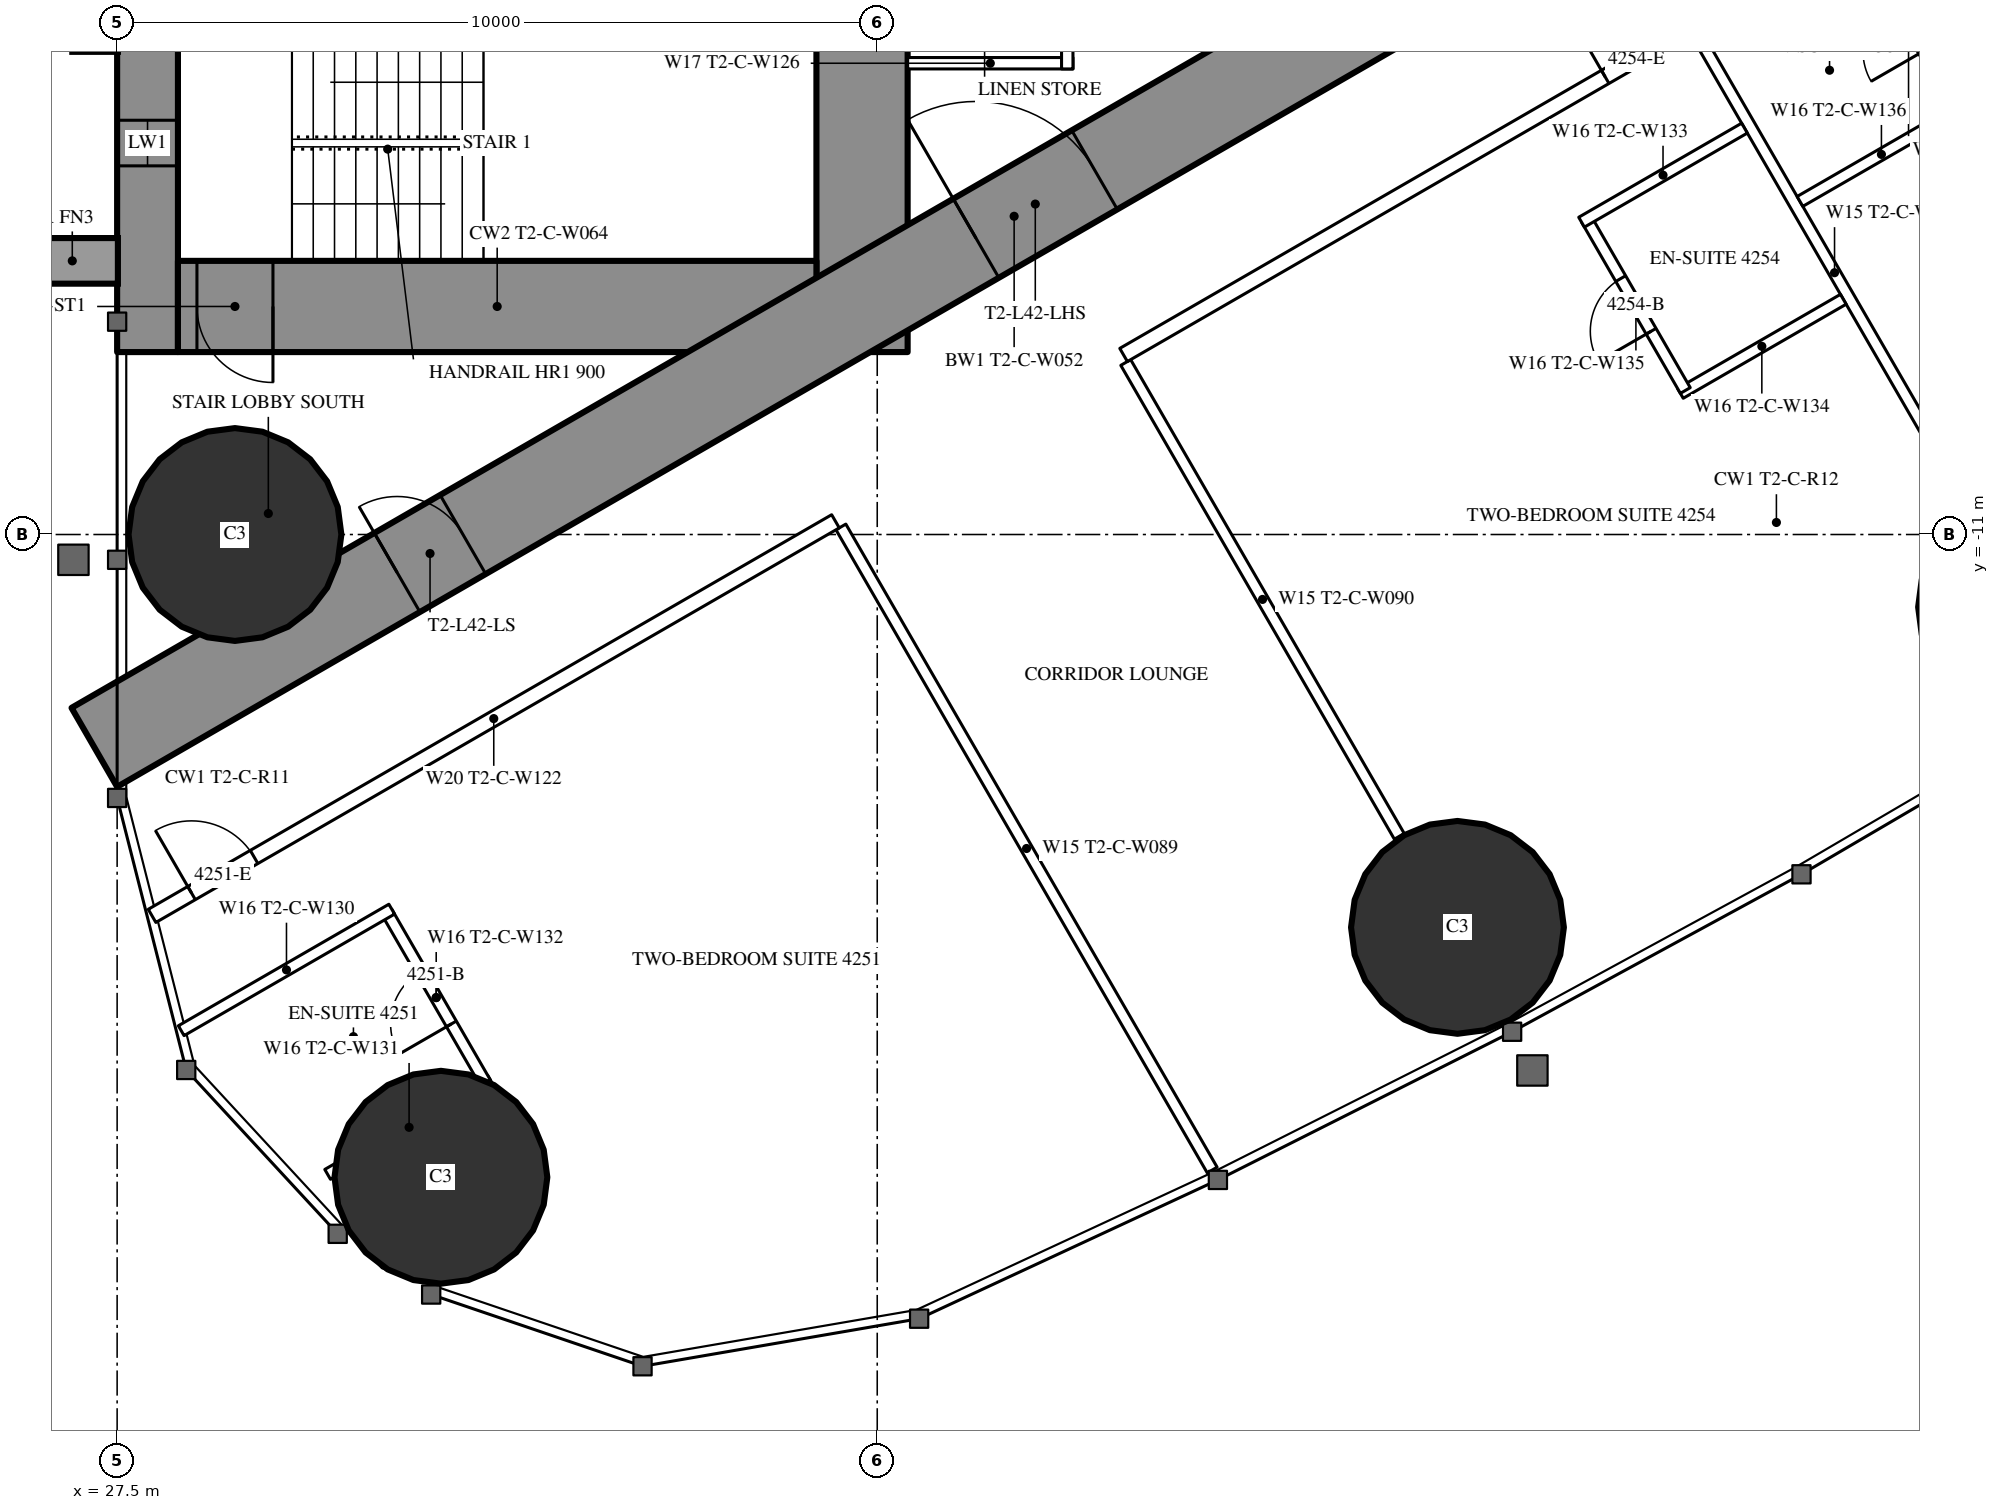
"""IFC4 building model, lengths in metres.
Left out: names, types, materials, properties, quantities, classifications, styles, units other than length and angle.
Written with IfcOpenShell. Run it as: python <this file> out.ifc"""

import sys

from ifc_helpers import new_model, si_unit, direction, frame, frame_2d, origin, origin_2d, place, context, subcontext, project, spatial, rectangle, circle, extrude, element, fill, save


model = new_model("IFC4")
c1 = context("Model", 3, precision=1e-05, world=origin(), true_north=direction((0.0, 1.0)))
c2 = subcontext(c1, "Body", "Model", "MODEL_VIEW")
j1 = project(units=[si_unit("LENGTHUNIT", "METRE"), si_unit("PLANEANGLEUNIT", "RADIAN")], contexts=[c1])
p1 = place(None, origin())
s1 = spatial("IfcSite", under=j1, at=p1, CompositionType="ELEMENT")
p2 = place(p1, origin())
s2 = spatial("IfcBuilding", under=s1, at=p2, CompositionType="ELEMENT")
p3 = place(p2, frame((0.0, 0.0, 159.8)))
s3 = spatial("IfcBuildingStorey", under=s2, at=p3, CompositionType="ELEMENT", Elevation=159.8)
for number, where, z_axis, x_axis in (
    (1, (31.76, -19.456, 0.0), (0.0, 0.0, 1.0), (1.0, 0.0, 0.0)),
    (2, (29.05, -11.0, 0.0), (0.0, 0.0, 1.0), (1.0, 0.0, 0.0)),
    (3, (45.134, -16.168, 0.0), (0.0, 0.0, 1.0), (1.0, 0.0, 0.0)),
    (4, (52.594, -11.955, 0.0), (0.0, 0.0, 1.0), (1.0, 0.0, 0.0)),
):
    element("IfcColumn", number, at=place(p3, frame(where, z_axis=z_axis, x_axis=x_axis)), inside=s3, PredefinedType="COLUMN", context=c2, shape_type="SweptSolid", body=[
        extrude(circle(Radius=1.4, at=origin_2d()), origin(), (0.0, 0.0, 1.0), 3.5),
    ])
p4 = place(p3, frame((27.9, -8.6, 0.0), z_axis=(0.0, 0.0, 1.0), x_axis=(0.0, 1.0, 0.0)))
e5 = element("IfcWall", 5, at=p4, inside=s3, PredefinedType="SHEAR", context=c2, shape_type="SweptSolid", body=[
    extrude(rectangle(XDim=17.2, YDim=0.8, at=frame_2d((8.6, 0.0))), origin(), (0.0, 0.0, 1.0), 3.5),
])
p5 = place(p4, frame((2.45, 0.0, 0.6)))
e6 = element("IfcOpeningElement", 6, at=p5, cuts=e5, PredefinedType="OPENING", context=c2, shape_type="SweptSolid", body=[
    extrude(rectangle(XDim=0.6, YDim=2.1, at=frame_2d((0.3, 1.05))), frame((0.0, 0.41, 0.0), z_axis=(0.0, -1.0, 0.0), x_axis=(1.0, 0.0, 0.0)), (0.0, 0.0, 1.0), 0.82),
])
p6 = place(p4, frame((14.15, 0.0, 0.6)))
e7 = element("IfcOpeningElement", 7, at=p6, cuts=e5, PredefinedType="OPENING", context=c2, shape_type="SweptSolid", body=[
    extrude(rectangle(XDim=0.6, YDim=2.1, at=frame_2d((0.3, 1.05))), frame((0.0, 0.41, 0.0), z_axis=(0.0, -1.0, 0.0), x_axis=(1.0, 0.0, 0.0)), (0.0, 0.0, 1.0), 0.82),
])
p7 = place(p3, frame((37.3, -8.6, 0.0), z_axis=(0.0, 0.0, 1.0), x_axis=(0.0, 1.0, 0.0)))
e8 = element("IfcWall", 8, at=p7, inside=s3, PredefinedType="SHEAR", context=c2, shape_type="SweptSolid", body=[
    extrude(rectangle(XDim=17.2, YDim=1.2, at=frame_2d((8.6, 0.0))), origin(), (0.0, 0.0, 1.0), 3.5),
])
p8 = place(p7, frame((7.7, 0.0, 0.0)))
e9 = element("IfcOpeningElement", 9, at=p8, cuts=e8, PredefinedType="OPENING", context=c2, shape_type="SweptSolid", body=[
    extrude(rectangle(XDim=1.8, YDim=2.2, at=frame_2d((0.9, 1.1))), frame((0.0, 0.61, 0.0), z_axis=(0.0, -1.0, 0.0), x_axis=(1.0, 0.0, 0.0)), (0.0, 0.0, 1.0), 1.22),
])
p9 = place(p3, frame((28.3, -8.0, 0.0), z_axis=(0.0, 0.0, 1.0), x_axis=(1.0, 0.0, 0.0)))
e10 = element("IfcWall", 10, at=p9, inside=s3, PredefinedType="SHEAR", context=c2, shape_type="SweptSolid", body=[
    extrude(rectangle(XDim=8.4, YDim=1.2, at=frame_2d((4.2, 0.0))), origin(), (0.0, 0.0, 1.0), 3.5),
])
p10 = place(p9, frame((0.25, 0.0, 0.0)))
e11 = element("IfcOpeningElement", 11, at=p10, cuts=e10, PredefinedType="OPENING", context=c2, shape_type="SweptSolid", body=[
    extrude(rectangle(XDim=1.0, YDim=2.2, at=frame_2d((0.5, 1.1))), frame((0.0, 0.61, 0.0), z_axis=(0.0, -1.0, 0.0), x_axis=(1.0, 0.0, 0.0)), (0.0, 0.0, 1.0), 1.22),
])
p11 = place(p3, frame((27.2, -13.8, 0.0), z_axis=(0.0, 0.0, 1.0), x_axis=(0.866027159892, 0.499996958321, 0.0)))
e12 = element("IfcWall", 12, at=p11, inside=s3, PredefinedType="SHEAR", context=c2, shape_type="SweptSolid", body=[
    extrude(rectangle(XDim=27.947, YDim=1.2, at=frame_2d((13.973, 0.0))), origin(), (0.0, 0.0, 1.0), 3.5),
])
p12 = place(p11, frame((4.6, 0.0, 0.0)))
e13 = element("IfcOpeningElement", 13, at=p12, cuts=e12, PredefinedType="OPENING", context=c2, shape_type="SweptSolid", body=[
    extrude(rectangle(XDim=1.0, YDim=2.2, at=frame_2d((0.5, 1.1))), frame((0.0, 0.61, 0.0), z_axis=(0.0, -1.0, 0.0), x_axis=(1.0, 0.0, 0.0)), (0.0, 0.0, 1.0), 1.22),
])
p13 = place(p11, frame((13.395, 0.0, 0.0)))
e14 = element("IfcOpeningElement", 14, at=p13, cuts=e12, PredefinedType="OPENING", context=c2, shape_type="SweptSolid", body=[
    extrude(rectangle(XDim=1.8, YDim=2.2, at=frame_2d((0.9, 1.1))), frame((0.0, 0.61, 0.0), z_axis=(0.0, -1.0, 0.0), x_axis=(1.0, 0.0, 0.0)), (0.0, 0.0, 1.0), 1.22),
])
p14 = place(p3, frame((37.022, -10.9, 0.0), z_axis=(0.0, 0.0, 1.0), x_axis=(0.499998620953, -0.866026199976, 0.0)))
e15 = element("IfcWall", 15, at=p14, inside=s3, PredefinedType="PARTITIONING", context=c2, shape_type="SweptSolid", body=[
    extrude(rectangle(XDim=9.77, YDim=0.15, at=frame_2d((4.885, 0.0))), origin(), (0.0, 0.0, 1.0), 3.25),
])
p15 = place(p3, frame((40.769, -8.737, 0.0), z_axis=(0.0, 0.0, 1.0), x_axis=(0.500013115284, -0.866017831539, 0.0)))
e16 = element("IfcWall", 16, at=p15, inside=s3, PredefinedType="PARTITIONING", context=c2, shape_type="SweptSolid", body=[
    extrude(rectangle(XDim=7.198, YDim=0.15, at=frame_2d((3.599, 0.0))), origin(), (0.0, 0.0, 1.0), 2.3),
])
p16 = place(p3, frame((48.275, -4.404, 0.0), z_axis=(0.0, 0.0, 1.0), x_axis=(0.500006004368, -0.866021937133, 0.0)))
e17 = element("IfcWall", 17, at=p16, inside=s3, PredefinedType="PARTITIONING", context=c2, shape_type="SweptSolid", body=[
    extrude(rectangle(XDim=7.279, YDim=0.15, at=frame_2d((3.64, 0.0))), origin(), (0.0, 0.0, 1.0), 2.3),
])
p17 = place(p3, frame((27.959, -16.017, 0.0), z_axis=(0.0, 0.0, 1.0), x_axis=(0.866026201739, 0.499998617899, 0.0)))
e18 = element("IfcWall", 18, at=p17, inside=s3, PredefinedType="PARTITIONING", context=c2, shape_type="SweptSolid", body=[
    extrude(rectangle(XDim=10.382, YDim=0.2, at=frame_2d((5.191, 0.0))), origin(), (0.0, 0.0, 1.0), 3.25),
])
p18 = place(p17, frame((0.6, 0.0, 0.0)))
e19 = element("IfcOpeningElement", 19, at=p18, cuts=e18, PredefinedType="OPENING", context=c2, shape_type="SweptSolid", body=[
    extrude(rectangle(XDim=0.95, YDim=2.2, at=frame_2d((0.475, 1.1))), frame((0.0, 0.11, 0.0), z_axis=(0.0, -1.0, 0.0), x_axis=(1.0, 0.0, 0.0)), (0.0, 0.0, 1.0), 0.22),
])
p19 = place(p3, frame((40.741, -8.638, 0.0), z_axis=(0.0, 0.0, 1.0), x_axis=(0.866022967338, 0.500004220025, 0.0)))
e20 = element("IfcWall", 20, at=p19, inside=s3, PredefinedType="PARTITIONING", context=c2, shape_type="SweptSolid", body=[
    extrude(rectangle(XDim=17.276, YDim=0.2, at=frame_2d((8.638, 0.0))), origin(), (0.0, 0.0, 1.0), 3.25),
])
p20 = place(p19, frame((7.316, 0.0, 0.0)))
e21 = element("IfcOpeningElement", 21, at=p20, cuts=e20, PredefinedType="OPENING", context=c2, shape_type="SweptSolid", body=[
    extrude(rectangle(XDim=0.95, YDim=2.2, at=frame_2d((0.475, 1.1))), frame((0.0, 0.11, 0.0), z_axis=(0.0, -1.0, 0.0), x_axis=(1.0, 0.0, 0.0)), (0.0, 0.0, 1.0), 0.22),
])
p21 = place(p19, frame((11.366, 0.0, 0.0)))
e22 = element("IfcOpeningElement", 22, at=p21, cuts=e20, PredefinedType="OPENING", context=c2, shape_type="SweptSolid", body=[
    extrude(rectangle(XDim=0.95, YDim=2.2, at=frame_2d((0.475, 1.1))), frame((0.0, 0.11, 0.0), z_axis=(0.0, -1.0, 0.0), x_axis=(1.0, 0.0, 0.0)), (0.0, 0.0, 1.0), 0.22),
])
p22 = place(p19, frame((13.347, 0.0, 0.0)))
e23 = element("IfcOpeningElement", 23, at=p22, cuts=e20, PredefinedType="OPENING", context=c2, shape_type="SweptSolid", body=[
    extrude(rectangle(XDim=0.95, YDim=2.2, at=frame_2d((0.475, 1.1))), frame((0.0, 0.11, 0.0), z_axis=(0.0, -1.0, 0.0), x_axis=(1.0, 0.0, 0.0)), (0.0, 0.0, 1.0), 0.22),
])
p23 = place(p3, frame((30.269, -19.418, 0.0), z_axis=(0.0, 0.0, 1.0), x_axis=(0.866006523861, 0.500032699561, 0.0)))
e24 = element("IfcWall", 24, at=p23, inside=s3, PredefinedType="PARTITIONING", context=c2, shape_type="SweptSolid", body=[
    extrude(rectangle(XDim=2.475, YDim=0.15, at=frame_2d((1.237, 0.0))), origin(), (0.0, 0.0, 1.0), 3.25),
])
p24 = place(p3, frame((31.048, -15.966, 0.0), z_axis=(0.0, 0.0, 1.0), x_axis=(0.499936506574, -0.866062058628, 0.0)))
e25 = element("IfcWall", 25, at=p24, inside=s3, PredefinedType="PARTITIONING", context=c2, shape_type="SweptSolid", body=[
    extrude(rectangle(XDim=2.6, YDim=0.15, at=frame_2d((1.3, 0.0))), origin(), (0.0, 0.0, 1.0), 2.3),
])
p25 = place(p24, frame((0.9, 0.0, 0.0)))
e26 = element("IfcOpeningElement", 26, at=p25, cuts=e25, PredefinedType="OPENING", context=c2, shape_type="SweptSolid", body=[
    extrude(rectangle(XDim=0.8, YDim=2.2, at=frame_2d((0.4, 1.1))), frame((0.0, 0.085, 0.0), z_axis=(0.0, -1.0, 0.0), x_axis=(1.0, 0.0, 0.0)), (0.0, 0.0, 1.0), 0.17),
])
p26 = place(p3, frame((28.343, -17.528, 0.0), z_axis=(0.0, 0.0, 1.0), x_axis=(0.86600760081, 0.500030834389, 0.0)))
e27 = element("IfcWall", 27, at=p26, inside=s3, PredefinedType="PARTITIONING", context=c2, shape_type="SweptSolid", body=[
    extrude(rectangle(XDim=3.198, YDim=0.15, at=frame_2d((1.599, 0.0))), origin(), (0.0, 0.0, 1.0), 3.25),
])
p27 = place(p3, frame((48.066, -9.143, 0.0), z_axis=(0.0, 0.0, 1.0), x_axis=(0.866006523861, 0.500032699561, 0.0)))
e28 = element("IfcWall", 28, at=p27, inside=s3, PredefinedType="PARTITIONING", context=c2, shape_type="SweptSolid", body=[
    extrude(rectangle(XDim=2.475, YDim=0.15, at=frame_2d((1.237, 0.0))), origin(), (0.0, 0.0, 1.0), 3.25),
])
p28 = place(p3, frame((46.831, -6.854, 0.0), z_axis=(0.0, 0.0, 1.0), x_axis=(0.500006934395, -0.866021400173, 0.0)))
e29 = element("IfcWall", 29, at=p28, inside=s3, PredefinedType="PARTITIONING", context=c2, shape_type="SweptSolid", body=[
    extrude(rectangle(XDim=2.6, YDim=0.15, at=frame_2d((1.3, 0.0))), origin(), (0.0, 0.0, 1.0), 3.25),
])
p29 = place(p28, frame((0.9, 0.0, 0.0)))
e30 = element("IfcOpeningElement", 30, at=p29, cuts=e29, PredefinedType="OPENING", context=c2, shape_type="SweptSolid", body=[
    extrude(rectangle(XDim=0.8, YDim=2.2, at=frame_2d((0.4, 1.1))), frame((0.0, 0.085, 0.0), z_axis=(0.0, -1.0, 0.0), x_axis=(1.0, 0.0, 0.0)), (0.0, 0.0, 1.0), 0.17),
])
for number, where, z_axis, x_axis in (
    (31, (46.766, -6.891, 0.0), (0.0, 0.0, 1.0), (0.866, 0.5, 0.0)),
    (32, (49.64, -6.618, 0.0), (0.0, 0.0, 1.0), (0.866, 0.5, 0.0)),
):
    element("IfcWall", number, at=place(p3, frame(where, z_axis=z_axis, x_axis=x_axis)), inside=s3, PredefinedType="PARTITIONING", context=c2, shape_type="SweptSolid", body=[
        extrude(rectangle(XDim=2.475, YDim=0.15, at=frame_2d((1.237, 0.0))), origin(), (0.0, 0.0, 1.0), 3.25),
    ])
p30 = place(p3, frame((50.418, -3.166, 0.0), z_axis=(0.0, 0.0, 1.0), x_axis=(0.499936506574, -0.866062058628, 0.0)))
e33 = element("IfcWall", 33, at=p30, inside=s3, PredefinedType="PARTITIONING", context=c2, shape_type="SweptSolid", body=[
    extrude(rectangle(XDim=2.6, YDim=0.15, at=frame_2d((1.3, 0.0))), origin(), (0.0, 0.0, 1.0), 3.25),
])
p31 = place(p30, frame((0.9, 0.0, 0.0)))
e34 = element("IfcOpeningElement", 34, at=p31, cuts=e33, PredefinedType="OPENING", context=c2, shape_type="SweptSolid", body=[
    extrude(rectangle(XDim=0.8, YDim=2.2, at=frame_2d((0.4, 1.1))), frame((0.0, 0.085, 0.0), z_axis=(0.0, -1.0, 0.0), x_axis=(1.0, 0.0, 0.0)), (0.0, 0.0, 1.0), 0.17),
])
p32 = place(p3, frame((37.9, -4.8, 0.0), z_axis=(0.0, 0.0, 1.0), x_axis=(1.0, 0.0, 0.0)))
e35 = element("IfcWall", 35, at=p32, inside=s3, PredefinedType="PARTITIONING", context=c2, shape_type="SweptSolid", body=[
    extrude(rectangle(XDim=2.175, YDim=0.15, at=frame_2d((1.087, 0.0))), origin(), (0.0, 0.0, 1.0), 3.25),
])
p33 = place(p3, frame((40.0, -4.875, 0.0), z_axis=(0.0, 0.0, 1.0), x_axis=(0.0, 1.0, 0.0)))
e36 = element("IfcWall", 36, at=p33, inside=s3, PredefinedType="PARTITIONING", context=c2, shape_type="SweptSolid", body=[
    extrude(rectangle(XDim=1.95, YDim=0.15, at=frame_2d((0.975, 0.0))), origin(), (0.0, 0.0, 1.0), 3.25),
])
p34 = place(p33, frame((0.475, 0.0, 0.0)))
e37 = element("IfcOpeningElement", 37, at=p34, cuts=e36, PredefinedType="OPENING", context=c2, shape_type="SweptSolid", body=[
    extrude(rectangle(XDim=1.0, YDim=2.2, at=frame_2d((0.5, 1.1))), frame((0.0, 0.085, 0.0), z_axis=(0.0, -1.0, 0.0), x_axis=(1.0, 0.0, 0.0)), (0.0, 0.0, 1.0), 0.17),
])
p35 = place(p25, origin())
e38 = element("IfcDoor", 38, at=p35, inside=s3, OperationType="SINGLE_SWING_RIGHT", PredefinedType="DOOR", context=c2, shape_type="SweptSolid", body=[
    extrude(rectangle(XDim=0.8, YDim=2.2, at=frame_2d((0.4, 1.1))), frame((0.0, 0.025, 0.0), z_axis=(0.0, -1.0, 0.0), x_axis=(1.0, 0.0, 0.0)), (0.0, 0.0, 1.0), 0.05),
])
fill(e26, e38)
p36 = place(p18, origin())
e39 = element("IfcDoor", 39, at=p36, inside=s3, OperationType="SINGLE_SWING_LEFT", PredefinedType="DOOR", context=c2, shape_type="SweptSolid", body=[
    extrude(rectangle(XDim=0.95, YDim=2.2, at=frame_2d((0.475, 1.1))), frame((0.0, 0.025, 0.0), z_axis=(0.0, -1.0, 0.0), x_axis=(1.0, 0.0, 0.0)), (0.0, 0.0, 1.0), 0.05),
])
fill(e19, e39)
p37 = place(p29, origin())
e40 = element("IfcDoor", 40, at=p37, inside=s3, OperationType="SINGLE_SWING_RIGHT", PredefinedType="DOOR", context=c2, shape_type="SweptSolid", body=[
    extrude(rectangle(XDim=0.8, YDim=2.2, at=frame_2d((0.4, 1.1))), frame((0.0, 0.025, 0.0), z_axis=(0.0, -1.0, 0.0), x_axis=(1.0, 0.0, 0.0)), (0.0, 0.0, 1.0), 0.05),
])
fill(e30, e40)
p38 = place(p20, origin())
e41 = element("IfcDoor", 41, at=p38, inside=s3, OperationType="SINGLE_SWING_LEFT", PredefinedType="DOOR", context=c2, shape_type="SweptSolid", body=[
    extrude(rectangle(XDim=0.95, YDim=2.2, at=frame_2d((0.475, 1.1))), frame((0.0, 0.025, 0.0), z_axis=(0.0, -1.0, 0.0), x_axis=(1.0, 0.0, 0.0)), (0.0, 0.0, 1.0), 0.05),
])
fill(e21, e41)
p39 = place(p12, origin())
e42 = element("IfcDoor", 42, at=p39, inside=s3, OperationType="SINGLE_SWING_LEFT", PredefinedType="DOOR", context=c2, shape_type="SweptSolid", body=[
    extrude(rectangle(XDim=1.0, YDim=2.2, at=frame_2d((0.5, 1.1))), frame((0.0, 0.025, 0.0), z_axis=(0.0, -1.0, 0.0), x_axis=(1.0, 0.0, 0.0)), (0.0, 0.0, 1.0), 0.05),
])
fill(e13, e42)
p40 = place(p13, origin())
e43 = element("IfcDoor", 43, at=p40, inside=s3, OperationType="DOUBLE_DOOR_SINGLE_SWING", PredefinedType="DOOR", context=c2, shape_type="SweptSolid", body=[
    extrude(rectangle(XDim=1.8, YDim=2.2, at=frame_2d((0.9, 1.1))), frame((0.0, 0.025, 0.0), z_axis=(0.0, -1.0, 0.0), x_axis=(1.0, 0.0, 0.0)), (0.0, 0.0, 1.0), 0.05),
])
fill(e14, e43)
p41 = place(p10, origin())
e44 = element("IfcDoor", 44, at=p41, inside=s3, OperationType="SINGLE_SWING_RIGHT", PredefinedType="DOOR", context=c2, shape_type="SweptSolid", body=[
    extrude(rectangle(XDim=1.0, YDim=2.2, at=frame_2d((0.5, 1.1))), frame((0.0, 0.025, 0.0), z_axis=(0.0, -1.0, 0.0), x_axis=(1.0, 0.0, 0.0)), (0.0, 0.0, 1.0), 0.05),
])
fill(e11, e44)
p42 = place(p5, origin())
e45 = element("IfcWindow", 45, at=p42, inside=s3, PartitioningType="SINGLE_PANEL", PredefinedType="WINDOW", context=c2, shape_type="SweptSolid", body=[
    extrude(rectangle(XDim=0.6, YDim=2.1, at=frame_2d((0.3, 1.05))), frame((0.0, 0.03, 0.0), z_axis=(0.0, -1.0, 0.0), x_axis=(1.0, 0.0, 0.0)), (0.0, 0.0, 1.0), 0.06),
])
fill(e6, e45)
save(model, sys.argv[1])
